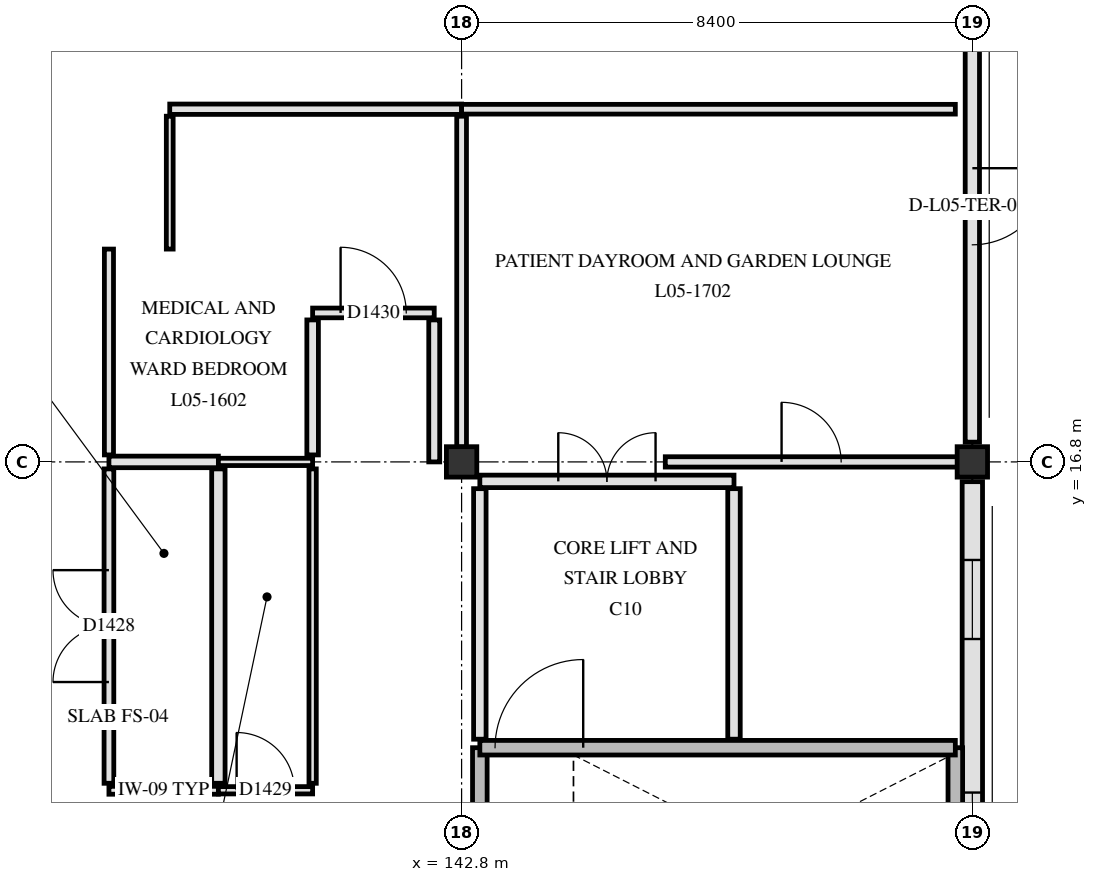
"""IFC4 building model, lengths in metres.
Left out: names, types, materials, properties, quantities, classifications, styles, units other than length and angle.
Written with IfcOpenShell. Run it as: python <this file> out.ifc"""

import sys

from ifc_helpers import new_model, si_unit, direction, frame, frame_2d, origin, origin_2d, place, context, subcontext, project, spatial, rectangle, extrude, element, fill, save


model = new_model("IFC4")
c1 = context("Model", 3, precision=1e-05, world=origin(), true_north=direction((0.0, 1.0)))
c2 = subcontext(c1, "Body", "Model", "MODEL_VIEW")
j1 = project(units=[si_unit("LENGTHUNIT", "METRE"), si_unit("PLANEANGLEUNIT", "RADIAN")], contexts=[c1])
p1 = place(None, origin())
s1 = spatial("IfcSite", under=j1, at=p1, CompositionType="ELEMENT")
p2 = place(p1, origin())
s2 = spatial("IfcBuilding", under=s1, at=p2, CompositionType="ELEMENT")
p3 = place(p2, frame((0.0, 0.0, 22.5)))
s3 = spatial("IfcBuildingStorey", under=s2, at=p3, CompositionType="ELEMENT", Elevation=22.5)
for number, where, z_axis, x_axis in (
    (1, (142.8, 16.8, 0.0), (0.0, 0.0, 1.0), (1.0, 0.0, 0.0)),
    (2, (151.2, 16.8, 0.0), (0.0, 0.0, 1.0), (1.0, 0.0, 0.0)),
):
    element("IfcColumn", number, at=place(p3, frame(where, z_axis=z_axis, x_axis=x_axis)), inside=s3, PredefinedType="COLUMN", context=c2, shape_type="SweptSolid", body=[
        extrude(rectangle(XDim=0.5, YDim=0.5, at=origin_2d()), origin(), (0.0, 0.0, 1.0), 3.9),
    ])
p4 = place(p3, frame((151.2, 24.875, 0.0), z_axis=(0.0, 0.0, 1.0), x_axis=(0.0, -1.0, 0.0)))
e3 = element("IfcWall", 3, at=p4, inside=s3, PredefinedType="SOLIDWALL", context=c2, shape_type="SweptSolid", body=[
    extrude(rectangle(XDim=7.75, YDim=0.235, at=frame_2d((3.875, 0.0))), origin(), (0.0, 0.0, 1.0), 3.37),
])
p5 = place(p4, frame((3.245, 0.0, 0.0)))
e4 = element("IfcOpeningElement", 4, at=p5, cuts=e3, PredefinedType="OPENING", context=c2, shape_type="SweptSolid", body=[
    extrude(rectangle(XDim=1.26, YDim=2.15, at=frame_2d((0.63, 1.075))), frame((0.0, 0.127, 0.0), z_axis=(0.0, -1.0, 0.0), x_axis=(1.0, 0.0, 0.0)), (0.0, 0.0, 1.0), 0.255),
])
p6 = place(p3, frame((151.2, 16.475, 0.0), z_axis=(0.0, 0.0, 1.0), x_axis=(0.0, -1.0, 0.0)))
e5 = element("IfcWall", 5, at=p6, inside=s3, PredefinedType="SOLIDWALL", context=c2, shape_type="SweptSolid", body=[
    extrude(rectangle(XDim=7.75, YDim=0.335, at=frame_2d((3.875, 0.0))), origin(), (0.0, 0.0, 1.0), 3.37),
])
p7 = place(p6, frame((1.288, 0.0, 0.85)))
e6 = element("IfcOpeningElement", 6, at=p7, cuts=e5, PredefinedType="OPENING", context=c2, shape_type="SweptSolid", body=[
    extrude(rectangle(XDim=1.3, YDim=1.66, at=frame_2d((0.65, 0.83))), frame((0.0, 0.177, 0.0), z_axis=(0.0, -1.0, 0.0), x_axis=(1.0, 0.0, 0.0)), (0.0, 0.0, 1.0), 0.355),
])
p8 = place(p6, frame((5.113, 0.0, 0.85)))
e7 = element("IfcOpeningElement", 7, at=p8, cuts=e5, PredefinedType="OPENING", context=c2, shape_type="SweptSolid", body=[
    extrude(rectangle(XDim=1.4, YDim=1.66, at=frame_2d((0.7, 0.83))), frame((0.0, 0.177, 0.0), z_axis=(0.0, -1.0, 0.0), x_axis=(1.0, 0.0, 0.0)), (0.0, 0.0, 1.0), 0.355),
])
for number, where, z_axis, x_axis in (
    (8, (143.1, 8.78, 0.0), (0.0, 0.0, 1.0), (0.0, 1.0, 0.0)),
    (9, (150.92, 8.78, 0.0), (0.0, 0.0, 1.0), (0.0, 1.0, 0.0)),
):
    element("IfcWall", number, at=place(p3, frame(where, z_axis=z_axis, x_axis=x_axis)), inside=s3, PredefinedType="SHEAR", context=c2, shape_type="SweptSolid", body=[
        extrude(rectangle(XDim=3.32, YDim=0.24, at=frame_2d((1.66, 0.0))), origin(), (0.0, 0.0, 1.0), 3.62),
    ])
p9 = place(p3, frame((143.1, 12.1, 0.0), z_axis=(0.0, 0.0, 1.0), x_axis=(1.0, 0.0, 0.0)))
e10 = element("IfcWall", 10, at=p9, inside=s3, PredefinedType="SHEAR", context=c2, shape_type="SweptSolid", body=[
    extrude(rectangle(XDim=7.82, YDim=0.24, at=frame_2d((3.91, 0.0))), origin(), (0.0, 0.0, 1.0), 3.62),
])
p10 = place(p9, frame((0.25, 0.0, 0.0)))
e11 = element("IfcOpeningElement", 11, at=p10, cuts=e10, PredefinedType="OPENING", context=c2, shape_type="SweptSolid", body=[
    extrude(rectangle(XDim=1.45, YDim=2.2, at=frame_2d((0.725, 1.1))), frame((0.0, 0.13, 0.0), z_axis=(0.0, -1.0, 0.0), x_axis=(1.0, 0.0, 0.0)), (0.0, 0.0, 1.0), 0.26),
])
for number, where, z_axis, x_axis in (
    (12, (147.28, 12.24, 0.0), (0.0, 0.0, 1.0), (0.0, 1.0, 0.0)),
    (13, (143.1, 12.24, 0.0), (0.0, 0.0, 1.0), (0.0, 1.0, 0.0)),
):
    element("IfcWall", number, at=place(p3, frame(where, z_axis=z_axis, x_axis=x_axis)), inside=s3, PredefinedType="PARTITIONING", context=c2, shape_type="SweptSolid", body=[
        extrude(rectangle(XDim=4.12, YDim=0.205, at=frame_2d((2.06, 0.0))), origin(), (0.0, 0.0, 1.0), 3.61),
    ])
p11 = place(p3, frame((143.1, 16.48, 0.0), z_axis=(0.0, 0.0, 1.0), x_axis=(1.0, 0.0, 0.0)))
e14 = element("IfcWall", 14, at=p11, inside=s3, PredefinedType="PARTITIONING", context=c2, shape_type="SweptSolid", body=[
    extrude(rectangle(XDim=4.18, YDim=0.205, at=frame_2d((2.09, 0.0))), origin(), (0.0, 0.0, 1.0), 3.61),
])
p12 = place(p11, frame((1.29, 0.0, 0.0)))
e15 = element("IfcOpeningElement", 15, at=p12, cuts=e14, PredefinedType="OPENING", context=c2, shape_type="SweptSolid", body=[
    extrude(rectangle(XDim=1.6, YDim=2.25, at=frame_2d((0.8, 1.125))), frame((0.0, 0.113, 0.0), z_axis=(0.0, -1.0, 0.0), x_axis=(1.0, 0.0, 0.0)), (0.0, 0.0, 1.0), 0.225),
])
p13 = place(p3, frame((137.0, 11.4, 0.0), z_axis=(0.0, 0.0, 1.0), x_axis=(1.0, 0.0, 0.0)))
e16 = element("IfcWall", 16, at=p13, inside=s3, PredefinedType="PARTITIONING", context=c2, shape_type="SweptSolid", body=[
    extrude(rectangle(XDim=1.8, YDim=0.13, at=frame_2d((0.9, 0.0))), origin(), (0.0, 0.0, 1.0), 3.61),
])
p14 = place(p3, frame((138.8, 11.4, 0.0), z_axis=(0.0, 0.0, 1.0), x_axis=(1.0, 0.0, 0.0)))
e17 = element("IfcWall", 17, at=p14, inside=s3, PredefinedType="PARTITIONING", context=c2, shape_type="SweptSolid", body=[
    extrude(rectangle(XDim=1.55, YDim=0.12, at=frame_2d((0.775, 0.0))), origin(), (0.0, 0.0, 1.0), 3.61),
])
p15 = place(p14, frame((0.3, 0.0, 0.0)))
e18 = element("IfcOpeningElement", 18, at=p15, cuts=e17, PredefinedType="OPENING", context=c2, shape_type="SweptSolid", body=[
    extrude(rectangle(XDim=0.95, YDim=2.1, at=frame_2d((0.475, 1.05))), frame((0.0, 0.07, 0.0), z_axis=(0.0, -1.0, 0.0), x_axis=(1.0, 0.0, 0.0)), (0.0, 0.0, 1.0), 0.14),
])
p16 = place(p3, frame((137.0, 16.8, 0.0), z_axis=(0.0, 0.0, 1.0), x_axis=(1.0, 0.0, 0.0)))
e19 = element("IfcWall", 19, at=p16, inside=s3, PredefinedType="PARTITIONING", context=c2, shape_type="SweptSolid", body=[
    extrude(rectangle(XDim=1.8, YDim=0.19, at=frame_2d((0.9, 0.0))), origin(), (0.0, 0.0, 1.0), 3.16),
])
p17 = place(p3, frame((138.8, 16.8, 0.0), z_axis=(0.0, 0.0, 1.0), x_axis=(1.0, 0.0, 0.0)))
e20 = element("IfcWall", 20, at=p17, inside=s3, PredefinedType="PARTITIONING", context=c2, shape_type="SweptSolid", body=[
    extrude(rectangle(XDim=1.55, YDim=0.12, at=frame_2d((0.775, 0.0))), origin(), (0.0, 0.0, 1.0), 3.16),
])
p18 = place(p3, frame((146.15, 16.8, 0.0), z_axis=(0.0, 0.0, 1.0), x_axis=(1.0, 0.0, 0.0)))
e21 = element("IfcWall", 21, at=p18, inside=s3, PredefinedType="PARTITIONING", context=c2, shape_type="SweptSolid", body=[
    extrude(rectangle(XDim=4.805, YDim=0.17, at=frame_2d((2.403, 0.0))), origin(), (0.0, 0.0, 1.0), 3.15),
])
p19 = place(p18, frame((1.913, 0.0, 0.0)))
e22 = element("IfcOpeningElement", 22, at=p19, cuts=e21, PredefinedType="OPENING", context=c2, shape_type="SweptSolid", body=[
    extrude(rectangle(XDim=0.98, YDim=2.12, at=frame_2d((0.49, 1.06))), frame((0.0, 0.095, 0.0), z_axis=(0.0, -1.0, 0.0), x_axis=(1.0, 0.0, 0.0)), (0.0, 0.0, 1.0), 0.19),
])
p20 = place(p3, frame((140.35, 19.25, 0.0), z_axis=(0.0, 0.0, 1.0), x_axis=(1.0, 0.0, 0.0)))
e23 = element("IfcWall", 23, at=p20, inside=s3, PredefinedType="PARTITIONING", context=c2, shape_type="SweptSolid", body=[
    extrude(rectangle(XDim=2.0, YDim=0.16, at=frame_2d((1.0, 0.0))), origin(), (0.0, 0.0, 1.0), 3.61),
])
p21 = place(p20, frame((0.46, 0.0, 0.0)))
e24 = element("IfcOpeningElement", 24, at=p21, cuts=e23, PredefinedType="OPENING", context=c2, shape_type="SweptSolid", body=[
    extrude(rectangle(XDim=1.08, YDim=2.12, at=frame_2d((0.54, 1.06))), frame((0.0, 0.09, 0.0), z_axis=(0.0, -1.0, 0.0), x_axis=(1.0, 0.0, 0.0)), (0.0, 0.0, 1.0), 0.18),
])
p22 = place(p3, frame((138.0, 22.6, 0.0), z_axis=(0.0, 0.0, 1.0), x_axis=(1.0, 0.0, 0.0)))
e25 = element("IfcWall", 25, at=p22, inside=s3, PredefinedType="PARTITIONING", context=c2, shape_type="SweptSolid", body=[
    extrude(rectangle(XDim=4.8, YDim=0.17, at=frame_2d((2.4, 0.0))), origin(), (0.0, 0.0, 1.0), 3.29),
])
p23 = place(p3, frame((142.8, 22.6, 0.0), z_axis=(0.0, 0.0, 1.0), x_axis=(1.0, 0.0, 0.0)))
e26 = element("IfcWall", 26, at=p23, inside=s3, PredefinedType="PARTITIONING", context=c2, shape_type="SweptSolid", body=[
    extrude(rectangle(XDim=8.12, YDim=0.16, at=frame_2d((4.06, 0.0))), origin(), (0.0, 0.0, 1.0), 3.29),
])
p24 = place(p3, frame((137.0, 11.515, 0.0), z_axis=(0.0, 0.0, 1.0), x_axis=(0.0, 1.0, 0.0)))
e27 = element("IfcWall", 27, at=p24, inside=s3, PredefinedType="PARTITIONING", context=c2, shape_type="SweptSolid", body=[
    extrude(rectangle(XDim=5.17, YDim=0.16, at=frame_2d((2.585, 0.0))), origin(), (0.0, 0.0, 1.0), 3.34),
])
p25 = place(p24, frame((1.665, 0.0, 0.0)))
e28 = element("IfcOpeningElement", 28, at=p25, cuts=e27, PredefinedType="OPENING", context=c2, shape_type="SweptSolid", body=[
    extrude(rectangle(XDim=1.84, YDim=2.28, at=frame_2d((0.92, 1.14))), frame((0.0, 0.09, 0.0), z_axis=(0.0, -1.0, 0.0), x_axis=(1.0, 0.0, 0.0)), (0.0, 0.0, 1.0), 0.18),
])
p26 = place(p3, frame((137.0, 16.915, 0.0), z_axis=(0.0, 0.0, 1.0), x_axis=(0.0, 1.0, 0.0)))
e29 = element("IfcWall", 29, at=p26, inside=s3, PredefinedType="PARTITIONING", context=c2, shape_type="SweptSolid", body=[
    extrude(rectangle(XDim=3.385, YDim=0.15, at=frame_2d((1.692, 0.0))), origin(), (0.0, 0.0, 1.0), 3.34),
])
p27 = place(p3, frame((138.0, 20.3, 0.0), z_axis=(0.0, 0.0, 1.0), x_axis=(0.0, 1.0, 0.0)))
e30 = element("IfcWall", 30, at=p27, inside=s3, PredefinedType="PARTITIONING", context=c2, shape_type="SweptSolid", body=[
    extrude(rectangle(XDim=2.185, YDim=0.112, at=frame_2d((1.093, 0.0))), origin(), (0.0, 0.0, 1.0), 3.34),
])
p28 = place(p3, frame((138.8, 11.515, 0.0), z_axis=(0.0, 0.0, 1.0), x_axis=(0.0, 1.0, 0.0)))
e31 = element("IfcWall", 31, at=p28, inside=s3, PredefinedType="PARTITIONING", context=c2, shape_type="SweptSolid", body=[
    extrude(rectangle(XDim=5.17, YDim=0.22, at=frame_2d((2.585, 0.0))), origin(), (0.0, 0.0, 1.0), 3.34),
])
p29 = place(p3, frame((140.35, 11.515, 0.0), z_axis=(0.0, 0.0, 1.0), x_axis=(0.0, 1.0, 0.0)))
e32 = element("IfcWall", 32, at=p29, inside=s3, PredefinedType="PARTITIONING", context=c2, shape_type="SweptSolid", body=[
    extrude(rectangle(XDim=5.17, YDim=0.12, at=frame_2d((2.585, 0.0))), origin(), (0.0, 0.0, 1.0), 3.34),
])
p30 = place(p3, frame((140.35, 16.915, 0.0), z_axis=(0.0, 0.0, 1.0), x_axis=(0.0, 1.0, 0.0)))
e33 = element("IfcWall", 33, at=p30, inside=s3, PredefinedType="PARTITIONING", context=c2, shape_type="SweptSolid", body=[
    extrude(rectangle(XDim=2.22, YDim=0.19, at=frame_2d((1.11, 0.0))), origin(), (0.0, 0.0, 1.0), 3.61),
])
p31 = place(p3, frame((142.35, 16.8, 0.0), z_axis=(0.0, 0.0, 1.0), x_axis=(0.0, 1.0, 0.0)))
e34 = element("IfcWall", 34, at=p31, inside=s3, PredefinedType="PARTITIONING", context=c2, shape_type="SweptSolid", body=[
    extrude(rectangle(XDim=2.335, YDim=0.18, at=frame_2d((1.167, 0.0))), origin(), (0.0, 0.0, 1.0), 3.16),
])
p32 = place(p3, frame((142.8, 17.045, 0.0), z_axis=(0.0, 0.0, 1.0), x_axis=(0.0, 1.0, 0.0)))
e35 = element("IfcWall", 35, at=p32, inside=s3, PredefinedType="PARTITIONING", context=c2, shape_type="SweptSolid", body=[
    extrude(rectangle(XDim=5.44, YDim=0.16, at=frame_2d((2.72, 0.0))), origin(), (0.0, 0.0, 1.0), 3.29),
])
p33 = place(p7, origin())
e36 = element("IfcWindow", 36, at=p33, inside=s3, PartitioningType="SINGLE_PANEL", PredefinedType="WINDOW", context=c2, shape_type="SweptSolid", body=[
    extrude(rectangle(XDim=1.3, YDim=1.66, at=frame_2d((0.65, 0.83))), frame((0.0, 0.03, 0.0), z_axis=(0.0, -1.0, 0.0), x_axis=(1.0, 0.0, 0.0)), (0.0, 0.0, 1.0), 0.06),
])
fill(e6, e36)
p34 = place(p8, origin())
e37 = element("IfcWindow", 37, at=p34, inside=s3, PartitioningType="SINGLE_PANEL", PredefinedType="WINDOW", context=c2, shape_type="SweptSolid", body=[
    extrude(rectangle(XDim=1.4, YDim=1.66, at=frame_2d((0.7, 0.83))), frame((0.0, 0.03, 0.0), z_axis=(0.0, -1.0, 0.0), x_axis=(1.0, 0.0, 0.0)), (0.0, 0.0, 1.0), 0.06),
])
fill(e7, e37)
p35 = place(p5, origin())
e38 = element("IfcDoor", 38, at=p35, inside=s3, OperationType="SINGLE_SWING_LEFT", PredefinedType="DOOR", context=c2, shape_type="SweptSolid", body=[
    extrude(rectangle(XDim=1.26, YDim=2.15, at=frame_2d((0.63, 1.075))), frame((0.0, 0.025, 0.0), z_axis=(0.0, -1.0, 0.0), x_axis=(1.0, 0.0, 0.0)), (0.0, 0.0, 1.0), 0.05),
])
fill(e4, e38)
p36 = place(p10, origin())
e39 = element("IfcDoor", 39, at=p36, inside=s3, OperationType="SINGLE_SWING_RIGHT", PredefinedType="DOOR", context=c2, shape_type="SweptSolid", body=[
    extrude(rectangle(XDim=1.45, YDim=2.2, at=frame_2d((0.725, 1.1))), frame((0.0, 0.025, 0.0), z_axis=(0.0, -1.0, 0.0), x_axis=(1.0, 0.0, 0.0)), (0.0, 0.0, 1.0), 0.05),
])
fill(e11, e39)
p37 = place(p12, origin())
e40 = element("IfcDoor", 40, at=p37, inside=s3, OperationType="DOUBLE_SWING_LEFT", PredefinedType="DOOR", context=c2, shape_type="SweptSolid", body=[
    extrude(rectangle(XDim=1.6, YDim=2.25, at=frame_2d((0.8, 1.125))), frame((0.0, 0.025, 0.0), z_axis=(0.0, -1.0, 0.0), x_axis=(1.0, 0.0, 0.0)), (0.0, 0.0, 1.0), 0.05),
])
fill(e15, e40)
p38 = place(p25, origin())
e41 = element("IfcDoor", 41, at=p38, inside=s3, OperationType="DOUBLE_SWING_LEFT", PredefinedType="DOOR", context=c2, shape_type="SweptSolid", body=[
    extrude(rectangle(XDim=1.84, YDim=2.28, at=frame_2d((0.92, 1.14))), frame((0.0, 0.025, 0.0), z_axis=(0.0, -1.0, 0.0), x_axis=(1.0, 0.0, 0.0)), (0.0, 0.0, 1.0), 0.05),
])
fill(e28, e41)
p39 = place(p15, origin())
e42 = element("IfcDoor", 42, at=p39, inside=s3, OperationType="SINGLE_SWING_LEFT", PredefinedType="DOOR", context=c2, shape_type="SweptSolid", body=[
    extrude(rectangle(XDim=0.95, YDim=2.1, at=frame_2d((0.475, 1.05))), frame((0.0, 0.025, 0.0), z_axis=(0.0, -1.0, 0.0), x_axis=(1.0, 0.0, 0.0)), (0.0, 0.0, 1.0), 0.05),
])
fill(e18, e42)
p40 = place(p21, origin())
e43 = element("IfcDoor", 43, at=p40, inside=s3, OperationType="SINGLE_SWING_LEFT", PredefinedType="DOOR", context=c2, shape_type="SweptSolid", body=[
    extrude(rectangle(XDim=1.08, YDim=2.12, at=frame_2d((0.54, 1.06))), frame((0.0, 0.025, 0.0), z_axis=(0.0, -1.0, 0.0), x_axis=(1.0, 0.0, 0.0)), (0.0, 0.0, 1.0), 0.05),
])
fill(e24, e43)
p41 = place(p19, origin())
e44 = element("IfcDoor", 44, at=p41, inside=s3, OperationType="SINGLE_SWING_LEFT", PredefinedType="DOOR", context=c2, shape_type="SweptSolid", body=[
    extrude(rectangle(XDim=0.98, YDim=2.12, at=frame_2d((0.49, 1.06))), frame((0.0, 0.025, 0.0), z_axis=(0.0, -1.0, 0.0), x_axis=(1.0, 0.0, 0.0)), (0.0, 0.0, 1.0), 0.05),
])
fill(e22, e44)
save(model, sys.argv[1])
